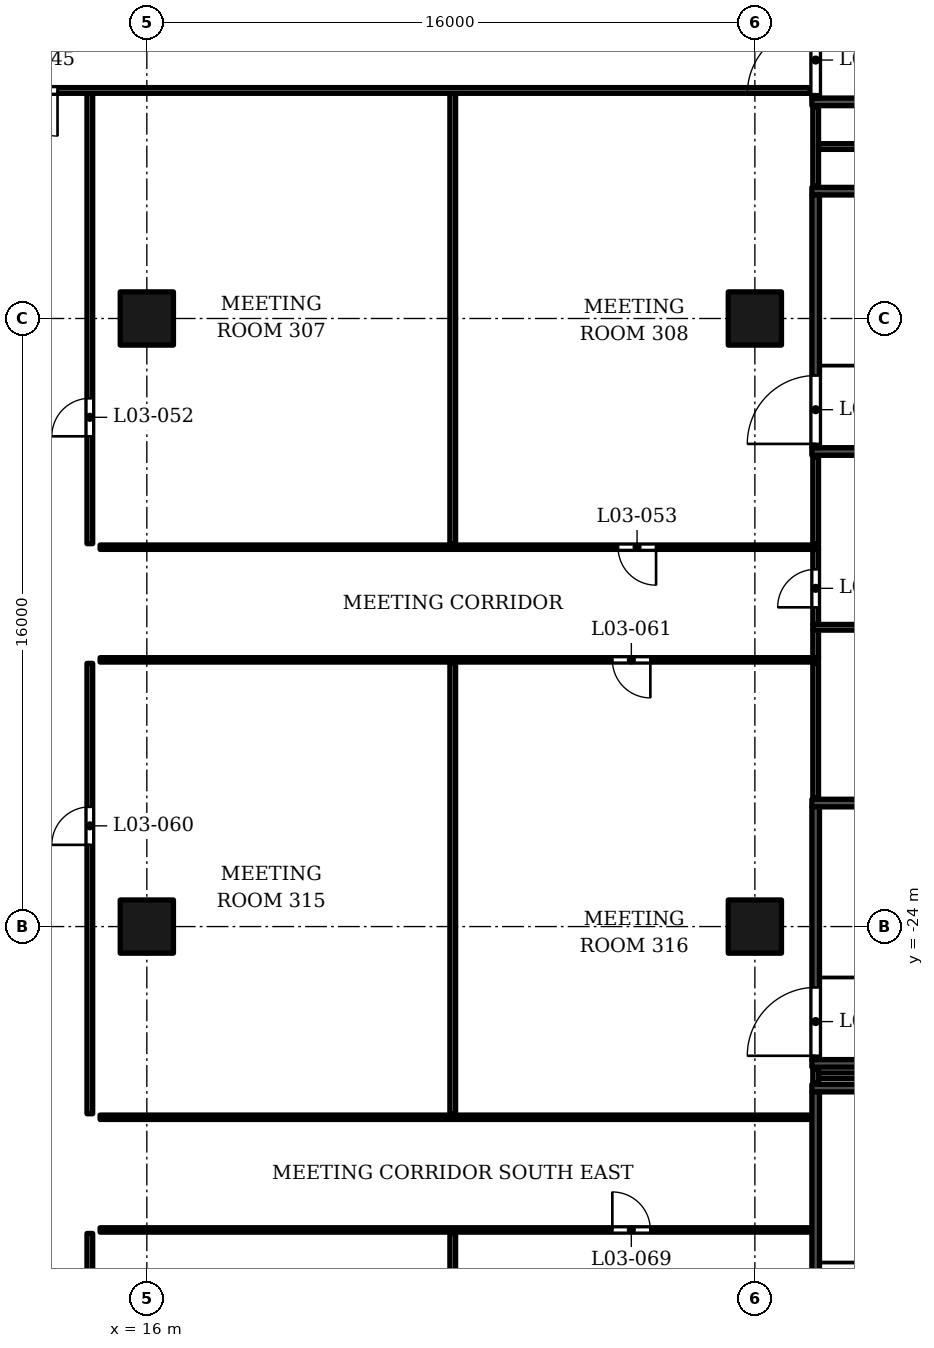
"""IFC4 building model, lengths in metres.
Left out: names, types, materials, properties, quantities, classifications, styles, units other than length and angle.
Written with IfcOpenShell. Run it as: python <this file> out.ifc"""

import sys

from ifc_helpers import new_model, si_unit, direction, frame, frame_2d, origin, origin_2d, place, context, subcontext, project, spatial, rectangle, extrude, element, fill, save


model = new_model("IFC4")
c1 = context("Model", 3, precision=1e-05, world=origin(), true_north=direction((0.0, 1.0)))
c2 = subcontext(c1, "Body", "Model", "MODEL_VIEW")
j1 = project(units=[si_unit("LENGTHUNIT", "METRE"), si_unit("PLANEANGLEUNIT", "RADIAN")], contexts=[c1])
p1 = place(None, origin())
s1 = spatial("IfcSite", under=j1, at=p1, CompositionType="ELEMENT")
p2 = place(p1, origin())
s2 = spatial("IfcBuilding", under=s1, at=p2, CompositionType="ELEMENT")
p3 = place(p2, frame((0.0, 0.0, 29.0)))
s3 = spatial("IfcBuildingStorey", under=s2, at=p3, CompositionType="ELEMENT", Elevation=29.0)
for number, where, z_axis, x_axis in (
    (1, (16.0, -24.0, 0.0), (0.0, 0.0, 1.0), (1.0, 0.0, 0.0)),
    (2, (16.0, -8.0, 0.0), (0.0, 0.0, 1.0), (1.0, 0.0, 0.0)),
    (3, (32.0, -24.0, 0.0), (0.0, 0.0, 1.0), (1.0, 0.0, 0.0)),
    (4, (32.0, -8.0, 0.0), (0.0, 0.0, 1.0), (1.0, 0.0, 0.0)),
):
    element("IfcColumn", number, at=place(p3, frame(where, z_axis=z_axis, x_axis=x_axis)), inside=s3, PredefinedType="COLUMN", context=c2, shape_type="SweptSolid", body=[
        extrude(rectangle(XDim=1.4, YDim=1.4, at=origin_2d()), origin(), (0.0, 0.0, 1.0), 5.5),
    ])
p4 = place(p3, frame((33.5, -28.25, 0.0), z_axis=(0.0, 0.0, 1.0), x_axis=(1.0, 0.0, 0.0)))
e5 = element("IfcWall", 5, at=p4, inside=s3, PredefinedType="SOLIDWALL", context=c2, shape_type="SweptSolid", body=[
    extrude(rectangle(XDim=4.87, YDim=0.2, at=frame_2d((2.435, 0.0))), origin(), (0.0, 0.0, 1.0), 5.05),
])
p5 = place(p3, frame((33.6, -35.0, 0.0), z_axis=(0.0, 0.0, 1.0), x_axis=(0.0, 1.0, 0.0)))
e6 = element("IfcWall", 6, at=p5, inside=s3, PredefinedType="SOLIDWALL", context=c2, shape_type="SweptSolid", body=[
    extrude(rectangle(XDim=6.65, YDim=0.2, at=frame_2d((3.325, 0.0))), origin(), (0.0, 0.0, 1.0), 5.05),
])
p6 = place(p5, frame((0.1, 0.0, 0.0)))
e7 = element("IfcOpeningElement", 7, at=p6, cuts=e6, PredefinedType="OPENING", context=c2, shape_type="SweptSolid", body=[
    extrude(rectangle(XDim=1.8, YDim=2.4, at=frame_2d((0.9, 1.2))), frame((0.0, 0.11, 0.0), z_axis=(0.0, -1.0, 0.0), x_axis=(1.0, 0.0, 0.0)), (0.0, 0.0, 1.0), 0.22),
])
for number, where, z_axis, x_axis in (
    (8, (33.5, -27.6, 0.0), (0.0, 0.0, 1.0), (1.0, 0.0, 0.0)),
    (9, (33.5, -20.75, 0.0), (0.0, 0.0, 1.0), (1.0, 0.0, 0.0)),
):
    element("IfcWall", number, at=place(p3, frame(where, z_axis=z_axis, x_axis=x_axis)), inside=s3, PredefinedType="SOLIDWALL", context=c2, shape_type="SweptSolid", body=[
        extrude(rectangle(XDim=4.87, YDim=0.2, at=frame_2d((2.435, 0.0))), origin(), (0.0, 0.0, 1.0), 5.05),
    ])
p7 = place(p3, frame((33.6, -27.5, 0.0), z_axis=(0.0, 0.0, 1.0), x_axis=(0.0, 1.0, 0.0)))
e10 = element("IfcWall", 10, at=p7, inside=s3, PredefinedType="SOLIDWALL", context=c2, shape_type="SweptSolid", body=[
    extrude(rectangle(XDim=6.65, YDim=0.2, at=frame_2d((3.325, 0.0))), origin(), (0.0, 0.0, 1.0), 5.05),
])
p8 = place(p7, frame((0.1, 0.0, 0.0)))
e11 = element("IfcOpeningElement", 11, at=p8, cuts=e10, PredefinedType="OPENING", context=c2, shape_type="SweptSolid", body=[
    extrude(rectangle(XDim=1.8, YDim=2.4, at=frame_2d((0.9, 1.2))), frame((0.0, 0.11, 0.0), z_axis=(0.0, -1.0, 0.0), x_axis=(1.0, 0.0, 0.0)), (0.0, 0.0, 1.0), 0.22),
])
for number, where, z_axis, x_axis in (
    (12, (33.5, -11.5, 0.0), (0.0, 0.0, 1.0), (1.0, 0.0, 0.0)),
    (13, (33.5, -4.65, 0.0), (0.0, 0.0, 1.0), (1.0, 0.0, 0.0)),
):
    element("IfcWall", number, at=place(p3, frame(where, z_axis=z_axis, x_axis=x_axis)), inside=s3, PredefinedType="SOLIDWALL", context=c2, shape_type="SweptSolid", body=[
        extrude(rectangle(XDim=4.87, YDim=0.2, at=frame_2d((2.435, 0.0))), origin(), (0.0, 0.0, 1.0), 5.05),
    ])
p9 = place(p3, frame((33.6, -11.4, 0.0), z_axis=(0.0, 0.0, 1.0), x_axis=(0.0, 1.0, 0.0)))
e14 = element("IfcWall", 14, at=p9, inside=s3, PredefinedType="SOLIDWALL", context=c2, shape_type="SweptSolid", body=[
    extrude(rectangle(XDim=6.65, YDim=0.2, at=frame_2d((3.325, 0.0))), origin(), (0.0, 0.0, 1.0), 5.05),
])
p10 = place(p9, frame((0.1, 0.0, 0.0)))
e15 = element("IfcOpeningElement", 15, at=p10, cuts=e14, PredefinedType="OPENING", context=c2, shape_type="SweptSolid", body=[
    extrude(rectangle(XDim=1.8, YDim=2.4, at=frame_2d((0.9, 1.2))), frame((0.0, 0.11, 0.0), z_axis=(0.0, -1.0, 0.0), x_axis=(1.0, 0.0, 0.0)), (0.0, 0.0, 1.0), 0.22),
])
p11 = place(p3, frame((33.5, -2.3, 0.0), z_axis=(0.0, 0.0, 1.0), x_axis=(1.0, 0.0, 0.0)))
e16 = element("IfcWall", 16, at=p11, inside=s3, PredefinedType="SOLIDWALL", context=c2, shape_type="SweptSolid", body=[
    extrude(rectangle(XDim=4.87, YDim=0.2, at=frame_2d((2.435, 0.0))), origin(), (0.0, 0.0, 1.0), 5.05),
])
p12 = place(p3, frame((33.6, -2.2, 0.0), z_axis=(0.0, 0.0, 1.0), x_axis=(0.0, 1.0, 0.0)))
e17 = element("IfcWall", 17, at=p12, inside=s3, PredefinedType="SOLIDWALL", context=c2, shape_type="SweptSolid", body=[
    extrude(rectangle(XDim=6.65, YDim=0.2, at=frame_2d((3.325, 0.0))), origin(), (0.0, 0.0, 1.0), 5.05),
])
p13 = place(p12, frame((0.1, 0.0, 0.0)))
e18 = element("IfcOpeningElement", 18, at=p13, cuts=e17, PredefinedType="OPENING", context=c2, shape_type="SweptSolid", body=[
    extrude(rectangle(XDim=1.8, YDim=2.4, at=frame_2d((0.9, 1.2))), frame((0.0, 0.11, 0.0), z_axis=(0.0, -1.0, 0.0), x_axis=(1.0, 0.0, 0.0)), (0.0, 0.0, 1.0), 0.22),
])
p14 = place(p3, frame((14.5, -43.77, 0.0), z_axis=(0.0, 0.0, 1.0), x_axis=(0.0, 1.0, 0.0)))
e19 = element("IfcWall", 19, at=p14, inside=s3, PredefinedType="PARTITIONING", context=c2, shape_type="SweptSolid", body=[
    extrude(rectangle(XDim=11.695, YDim=0.15, at=frame_2d((5.848, 0.0))), origin(), (0.0, 0.0, 1.0), 3.85),
])
p15 = place(p14, frame((5.92, 0.0, 0.0)))
e20 = element("IfcOpeningElement", 20, at=p15, cuts=e19, PredefinedType="OPENING", context=c2, shape_type="SweptSolid", body=[
    extrude(rectangle(XDim=1.0, YDim=2.1, at=frame_2d((0.5, 1.05))), frame((0.0, 0.085, 0.0), z_axis=(0.0, -1.0, 0.0), x_axis=(1.0, 0.0, 0.0)), (0.0, 0.0, 1.0), 0.17),
])
p16 = place(p3, frame((24.05, -43.77, 0.0), z_axis=(0.0, 0.0, 1.0), x_axis=(0.0, 1.0, 0.0)))
e21 = element("IfcWall", 21, at=p16, inside=s3, PredefinedType="PARTITIONING", context=c2, shape_type="SweptSolid", body=[
    extrude(rectangle(XDim=11.695, YDim=0.15, at=frame_2d((5.848, 0.0))), origin(), (0.0, 0.0, 1.0), 3.85),
])
p17 = place(p3, frame((14.77, -31.982, 0.0), z_axis=(0.0, 0.0, 1.0), x_axis=(1.0, 0.0, 0.0)))
e22 = element("IfcWall", 22, at=p17, inside=s3, PredefinedType="PARTITIONING", context=c2, shape_type="SweptSolid", body=[
    extrude(rectangle(XDim=18.69, YDim=0.115, at=frame_2d((9.345, 0.0))), origin(), (0.0, 0.0, 1.0), 3.85),
])
p18 = place(p17, frame((13.479, 0.0, 0.0)))
e23 = element("IfcOpeningElement", 23, at=p18, cuts=e22, PredefinedType="OPENING", context=c2, shape_type="SweptSolid", body=[
    extrude(rectangle(XDim=1.0, YDim=2.1, at=frame_2d((0.5, 1.05))), frame((0.0, 0.067, 0.0), z_axis=(0.0, -1.0, 0.0), x_axis=(1.0, 0.0, 0.0)), (0.0, 0.0, 1.0), 0.135),
])
p19 = place(p3, frame((14.77, -29.018, 0.0), z_axis=(0.0, 0.0, 1.0), x_axis=(1.0, 0.0, 0.0)))
e24 = element("IfcWall", 24, at=p19, inside=s3, PredefinedType="PARTITIONING", context=c2, shape_type="SweptSolid", body=[
    extrude(rectangle(XDim=18.69, YDim=0.115, at=frame_2d((9.345, 0.0))), origin(), (0.0, 0.0, 1.0), 3.85),
])
p20 = place(p3, frame((14.5, -28.925, 0.0), z_axis=(0.0, 0.0, 1.0), x_axis=(0.0, 1.0, 0.0)))
e25 = element("IfcWall", 25, at=p20, inside=s3, PredefinedType="PARTITIONING", context=c2, shape_type="SweptSolid", body=[
    extrude(rectangle(XDim=11.85, YDim=0.15, at=frame_2d((5.925, 0.0))), origin(), (0.0, 0.0, 1.0), 3.85),
])
p21 = place(p20, frame((7.075, 0.0, 0.0)))
e26 = element("IfcOpeningElement", 26, at=p21, cuts=e25, PredefinedType="OPENING", context=c2, shape_type="SweptSolid", body=[
    extrude(rectangle(XDim=1.0, YDim=2.1, at=frame_2d((0.5, 1.05))), frame((0.0, 0.085, 0.0), z_axis=(0.0, -1.0, 0.0), x_axis=(1.0, 0.0, 0.0)), (0.0, 0.0, 1.0), 0.17),
])
p22 = place(p3, frame((24.05, -28.925, 0.0), z_axis=(0.0, 0.0, 1.0), x_axis=(0.0, 1.0, 0.0)))
e27 = element("IfcWall", 27, at=p22, inside=s3, PredefinedType="PARTITIONING", context=c2, shape_type="SweptSolid", body=[
    extrude(rectangle(XDim=11.85, YDim=0.15, at=frame_2d((5.925, 0.0))), origin(), (0.0, 0.0, 1.0), 3.85),
])
p23 = place(p3, frame((33.6, -28.11, 0.0), z_axis=(0.0, 0.0, 1.0), x_axis=(0.0, 1.0, 0.0)))
e28 = element("IfcWall", 28, at=p23, inside=s3, PredefinedType="PARTITIONING", context=c2, shape_type="SweptSolid", body=[
    extrude(rectangle(XDim=0.37, YDim=0.15, at=frame_2d((0.185, 0.0))), origin(), (0.0, 0.0, 1.0), 5.05),
])
p24 = place(p3, frame((33.675, -27.925, 0.0), z_axis=(0.0, 0.0, 1.0), x_axis=(1.0, 0.0, 0.0)))
e29 = element("IfcWall", 29, at=p24, inside=s3, PredefinedType="PARTITIONING", context=c2, shape_type="SweptSolid", body=[
    extrude(rectangle(XDim=10.045, YDim=0.15, at=frame_2d((5.022, 0.0))), origin(), (0.0, 0.0, 1.0), 4.15),
])
p25 = place(p3, frame((33.6, -20.61, 0.0), z_axis=(0.0, 0.0, 1.0), x_axis=(0.0, 1.0, 0.0)))
e30 = element("IfcWall", 30, at=p25, inside=s3, PredefinedType="PARTITIONING", context=c2, shape_type="SweptSolid", body=[
    extrude(rectangle(XDim=3.535, YDim=0.15, at=frame_2d((1.768, 0.0))), origin(), (0.0, 0.0, 1.0), 5.05),
])
p26 = place(p3, frame((14.77, -16.982, 0.0), z_axis=(0.0, 0.0, 1.0), x_axis=(1.0, 0.0, 0.0)))
e31 = element("IfcWall", 31, at=p26, inside=s3, PredefinedType="PARTITIONING", context=c2, shape_type="SweptSolid", body=[
    extrude(rectangle(XDim=18.905, YDim=0.115, at=frame_2d((9.453, 0.0))), origin(), (0.0, 0.0, 1.0), 3.85),
])
p27 = place(p26, frame((13.48, 0.0, 0.0)))
e32 = element("IfcOpeningElement", 32, at=p27, cuts=e31, PredefinedType="OPENING", context=c2, shape_type="SweptSolid", body=[
    extrude(rectangle(XDim=1.0, YDim=2.1, at=frame_2d((0.5, 1.05))), frame((0.0, 0.067, 0.0), z_axis=(0.0, -1.0, 0.0), x_axis=(1.0, 0.0, 0.0)), (0.0, 0.0, 1.0), 0.135),
])
p28 = place(p3, frame((33.6, -16.925, 0.0), z_axis=(0.0, 0.0, 1.0), x_axis=(0.0, 1.0, 0.0)))
e33 = element("IfcWall", 33, at=p28, inside=s3, PredefinedType="PARTITIONING", context=c2, shape_type="SweptSolid", body=[
    extrude(rectangle(XDim=0.725, YDim=0.15, at=frame_2d((0.363, 0.0))), origin(), (0.0, 0.0, 1.0), 5.05),
])
p29 = place(p3, frame((33.525, -16.125, 0.0), z_axis=(0.0, 0.0, 1.0), x_axis=(1.0, 0.0, 0.0)))
e34 = element("IfcWall", 34, at=p29, inside=s3, PredefinedType="PARTITIONING", context=c2, shape_type="SweptSolid", body=[
    extrude(rectangle(XDim=10.195, YDim=0.15, at=frame_2d((5.098, 0.0))), origin(), (0.0, 0.0, 1.0), 4.15),
])
p30 = place(p3, frame((33.6, -16.05, 0.0), z_axis=(0.0, 0.0, 1.0), x_axis=(0.0, 1.0, 0.0)))
e35 = element("IfcWall", 35, at=p30, inside=s3, PredefinedType="PARTITIONING", context=c2, shape_type="SweptSolid", body=[
    extrude(rectangle(XDim=1.975, YDim=0.15, at=frame_2d((0.988, 0.0))), origin(), (0.0, 0.0, 1.0), 5.05),
])
p31 = place(p30, frame((0.45, 0.0, 0.0)))
e36 = element("IfcOpeningElement", 36, at=p31, cuts=e35, PredefinedType="OPENING", context=c2, shape_type="SweptSolid", body=[
    extrude(rectangle(XDim=1.0, YDim=2.1, at=frame_2d((0.5, 1.05))), frame((0.0, 0.085, 0.0), z_axis=(0.0, -1.0, 0.0), x_axis=(1.0, 0.0, 0.0)), (0.0, 0.0, 1.0), 0.17),
])
p32 = place(p3, frame((14.77, -14.018, 0.0), z_axis=(0.0, 0.0, 1.0), x_axis=(1.0, 0.0, 0.0)))
e37 = element("IfcWall", 37, at=p32, inside=s3, PredefinedType="PARTITIONING", context=c2, shape_type="SweptSolid", body=[
    extrude(rectangle(XDim=18.905, YDim=0.115, at=frame_2d((9.453, 0.0))), origin(), (0.0, 0.0, 1.0), 3.85),
])
p33 = place(p32, frame((13.63, 0.0, 0.0)))
e38 = element("IfcOpeningElement", 38, at=p33, cuts=e37, PredefinedType="OPENING", context=c2, shape_type="SweptSolid", body=[
    extrude(rectangle(XDim=1.0, YDim=2.1, at=frame_2d((0.5, 1.05))), frame((0.0, 0.067, 0.0), z_axis=(0.0, -1.0, 0.0), x_axis=(1.0, 0.0, 0.0)), (0.0, 0.0, 1.0), 0.135),
])
p34 = place(p3, frame((14.5, -13.925, 0.0), z_axis=(0.0, 0.0, 1.0), x_axis=(0.0, 1.0, 0.0)))
e39 = element("IfcWall", 39, at=p34, inside=s3, PredefinedType="PARTITIONING", context=c2, shape_type="SweptSolid", body=[
    extrude(rectangle(XDim=11.85, YDim=0.15, at=frame_2d((5.925, 0.0))), origin(), (0.0, 0.0, 1.0), 3.85),
])
p35 = place(p34, frame((2.825, 0.0, 0.0)))
e40 = element("IfcOpeningElement", 40, at=p35, cuts=e39, PredefinedType="OPENING", context=c2, shape_type="SweptSolid", body=[
    extrude(rectangle(XDim=1.0, YDim=2.1, at=frame_2d((0.5, 1.05))), frame((0.0, 0.085, 0.0), z_axis=(0.0, -1.0, 0.0), x_axis=(1.0, 0.0, 0.0)), (0.0, 0.0, 1.0), 0.17),
])
p36 = place(p3, frame((24.05, -13.925, 0.0), z_axis=(0.0, 0.0, 1.0), x_axis=(0.0, 1.0, 0.0)))
e41 = element("IfcWall", 41, at=p36, inside=s3, PredefinedType="PARTITIONING", context=c2, shape_type="SweptSolid", body=[
    extrude(rectangle(XDim=11.85, YDim=0.15, at=frame_2d((5.925, 0.0))), origin(), (0.0, 0.0, 1.0), 3.85),
])
p37 = place(p3, frame((33.6, -13.925, 0.0), z_axis=(0.0, 0.0, 1.0), x_axis=(0.0, 1.0, 0.0)))
e42 = element("IfcWall", 42, at=p37, inside=s3, PredefinedType="PARTITIONING", context=c2, shape_type="SweptSolid", body=[
    extrude(rectangle(XDim=2.285, YDim=0.15, at=frame_2d((1.143, 0.0))), origin(), (0.0, 0.0, 1.0), 5.05),
])
p38 = place(p3, frame((33.6, -4.51, 0.0), z_axis=(0.0, 0.0, 1.0), x_axis=(0.0, 1.0, 0.0)))
e43 = element("IfcWall", 43, at=p38, inside=s3, PredefinedType="PARTITIONING", context=c2, shape_type="SweptSolid", body=[
    extrude(rectangle(XDim=2.07, YDim=0.15, at=frame_2d((1.035, 0.0))), origin(), (0.0, 0.0, 1.0), 5.05),
])
p39 = place(p3, frame((33.675, -3.475, 0.0), z_axis=(0.0, 0.0, 1.0), x_axis=(1.0, 0.0, 0.0)))
e44 = element("IfcWall", 44, at=p39, inside=s3, PredefinedType="PARTITIONING", context=c2, shape_type="SweptSolid", body=[
    extrude(rectangle(XDim=10.045, YDim=0.15, at=frame_2d((5.022, 0.0))), origin(), (0.0, 0.0, 1.0), 4.15),
])
p40 = place(p3, frame((-33.46, -2.0, 0.0), z_axis=(0.0, 0.0, 1.0), x_axis=(1.0, 0.0, 0.0)))
e45 = element("IfcWall", 45, at=p40, inside=s3, PredefinedType="PARTITIONING", context=c2, shape_type="SweptSolid", body=[
    extrude(rectangle(XDim=66.92, YDim=0.15, at=frame_2d((33.46, 0.0))), origin(), (0.0, 0.0, 1.0), 3.85),
])
p41 = place(p40, frame((19.91, 0.0, 0.0)))
e46 = element("IfcOpeningElement", 46, at=p41, cuts=e45, PredefinedType="OPENING", context=c2, shape_type="SweptSolid", body=[
    extrude(rectangle(XDim=1.2, YDim=2.1, at=frame_2d((0.6, 1.05))), frame((0.0, 0.085, 0.0), z_axis=(0.0, -1.0, 0.0), x_axis=(1.0, 0.0, 0.0)), (0.0, 0.0, 1.0), 0.17),
])
p42 = place(p40, frame((45.91, 0.0, 0.0)))
e47 = element("IfcOpeningElement", 47, at=p42, cuts=e45, PredefinedType="OPENING", context=c2, shape_type="SweptSolid", body=[
    extrude(rectangle(XDim=1.2, YDim=2.1, at=frame_2d((0.6, 1.05))), frame((0.0, 0.085, 0.0), z_axis=(0.0, -1.0, 0.0), x_axis=(1.0, 0.0, 0.0)), (0.0, 0.0, 1.0), 0.17),
])
p43 = place(p40, frame((30.11, 0.0, 0.0)))
e48 = element("IfcOpeningElement", 48, at=p43, cuts=e45, PredefinedType="OPENING", context=c2, shape_type="SweptSolid", body=[
    extrude(rectangle(XDim=1.0, YDim=2.1, at=frame_2d((0.5, 1.05))), frame((0.0, 0.085, 0.0), z_axis=(0.0, -1.0, 0.0), x_axis=(1.0, 0.0, 0.0)), (0.0, 0.0, 1.0), 0.17),
])
p44 = place(p40, frame((35.86, 0.0, 0.0)))
e49 = element("IfcOpeningElement", 49, at=p44, cuts=e45, PredefinedType="OPENING", context=c2, shape_type="SweptSolid", body=[
    extrude(rectangle(XDim=1.0, YDim=2.1, at=frame_2d((0.5, 1.05))), frame((0.0, 0.085, 0.0), z_axis=(0.0, -1.0, 0.0), x_axis=(1.0, 0.0, 0.0)), (0.0, 0.0, 1.0), 0.17),
])
p45 = place(p8, origin())
e50 = element("IfcDoor", 50, at=p45, inside=s3, OperationType="DOUBLE_DOOR_SINGLE_SWING", PredefinedType="DOOR", context=c2, shape_type="SweptSolid", body=[
    extrude(rectangle(XDim=1.8, YDim=2.4, at=frame_2d((0.9, 1.2))), frame((0.0, 0.025, 0.0), z_axis=(0.0, -1.0, 0.0), x_axis=(1.0, 0.0, 0.0)), (0.0, 0.0, 1.0), 0.05),
])
fill(e11, e50)
p46 = place(p10, origin())
e51 = element("IfcDoor", 51, at=p46, inside=s3, OperationType="DOUBLE_DOOR_SINGLE_SWING", PredefinedType="DOOR", context=c2, shape_type="SweptSolid", body=[
    extrude(rectangle(XDim=1.8, YDim=2.4, at=frame_2d((0.9, 1.2))), frame((0.0, 0.025, 0.0), z_axis=(0.0, -1.0, 0.0), x_axis=(1.0, 0.0, 0.0)), (0.0, 0.0, 1.0), 0.05),
])
fill(e15, e51)
p47 = place(p13, origin())
e52 = element("IfcDoor", 52, at=p47, inside=s3, OperationType="DOUBLE_DOOR_SINGLE_SWING", PredefinedType="DOOR", context=c2, shape_type="SweptSolid", body=[
    extrude(rectangle(XDim=1.8, YDim=2.4, at=frame_2d((0.9, 1.2))), frame((0.0, 0.025, 0.0), z_axis=(0.0, -1.0, 0.0), x_axis=(1.0, 0.0, 0.0)), (0.0, 0.0, 1.0), 0.05),
])
fill(e18, e52)
p48 = place(p42, origin())
e53 = element("IfcDoor", 53, at=p48, inside=s3, OperationType="SINGLE_SWING_RIGHT", PredefinedType="DOOR", context=c2, shape_type="SweptSolid", body=[
    extrude(rectangle(XDim=1.2, YDim=2.1, at=frame_2d((0.6, 1.05))), frame((0.0, 0.025, 0.0), z_axis=(0.0, -1.0, 0.0), x_axis=(1.0, 0.0, 0.0)), (0.0, 0.0, 1.0), 0.05),
])
fill(e47, e53)
p49 = place(p35, origin())
e54 = element("IfcDoor", 54, at=p49, inside=s3, OperationType="SINGLE_SWING_LEFT", PredefinedType="DOOR", context=c2, shape_type="SweptSolid", body=[
    extrude(rectangle(XDim=1.0, YDim=2.1, at=frame_2d((0.5, 1.05))), frame((0.0, 0.025, 0.0), z_axis=(0.0, -1.0, 0.0), x_axis=(1.0, 0.0, 0.0)), (0.0, 0.0, 1.0), 0.05),
])
fill(e40, e54)
p50 = place(p33, origin())
e55 = element("IfcDoor", 55, at=p50, inside=s3, OperationType="SINGLE_SWING_RIGHT", PredefinedType="DOOR", context=c2, shape_type="SweptSolid", body=[
    extrude(rectangle(XDim=1.0, YDim=2.1, at=frame_2d((0.5, 1.05))), frame((0.0, 0.025, 0.0), z_axis=(0.0, -1.0, 0.0), x_axis=(1.0, 0.0, 0.0)), (0.0, 0.0, 1.0), 0.05),
])
fill(e38, e55)
p51 = place(p21, origin())
e56 = element("IfcDoor", 56, at=p51, inside=s3, OperationType="SINGLE_SWING_LEFT", PredefinedType="DOOR", context=c2, shape_type="SweptSolid", body=[
    extrude(rectangle(XDim=1.0, YDim=2.1, at=frame_2d((0.5, 1.05))), frame((0.0, 0.025, 0.0), z_axis=(0.0, -1.0, 0.0), x_axis=(1.0, 0.0, 0.0)), (0.0, 0.0, 1.0), 0.05),
])
fill(e26, e56)
p52 = place(p27, origin())
e57 = element("IfcDoor", 57, at=p52, inside=s3, OperationType="SINGLE_SWING_RIGHT", PredefinedType="DOOR", context=c2, shape_type="SweptSolid", body=[
    extrude(rectangle(XDim=1.0, YDim=2.1, at=frame_2d((0.5, 1.05))), frame((0.0, 0.025, 0.0), z_axis=(0.0, -1.0, 0.0), x_axis=(1.0, 0.0, 0.0)), (0.0, 0.0, 1.0), 0.05),
])
fill(e32, e57)
p53 = place(p18, origin())
e58 = element("IfcDoor", 58, at=p53, inside=s3, OperationType="SINGLE_SWING_LEFT", PredefinedType="DOOR", context=c2, shape_type="SweptSolid", body=[
    extrude(rectangle(XDim=1.0, YDim=2.1, at=frame_2d((0.5, 1.05))), frame((0.0, 0.025, 0.0), z_axis=(0.0, -1.0, 0.0), x_axis=(1.0, 0.0, 0.0)), (0.0, 0.0, 1.0), 0.05),
])
fill(e23, e58)
p54 = place(p31, origin())
e59 = element("IfcDoor", 59, at=p54, inside=s3, OperationType="SINGLE_SWING_LEFT", PredefinedType="DOOR", context=c2, shape_type="SweptSolid", body=[
    extrude(rectangle(XDim=1.0, YDim=2.1, at=frame_2d((0.5, 1.05))), frame((0.0, 0.025, 0.0), z_axis=(0.0, -1.0, 0.0), x_axis=(1.0, 0.0, 0.0)), (0.0, 0.0, 1.0), 0.05),
])
fill(e36, e59)
save(model, sys.argv[1])
